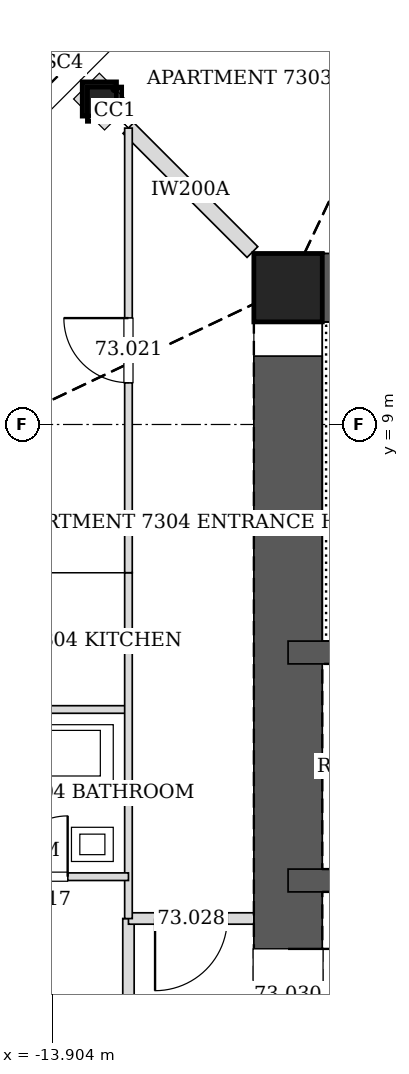
"""IFC4 building model, lengths in metres.
Left out: names, types, materials, properties, quantities, classifications, styles, units other than length and angle.
Written with IfcOpenShell. Run it as: python <this file> out.ifc"""

import sys

from ifc_helpers import new_model, si_unit, direction, frame, frame_2d, origin, origin_2d, place, context, subcontext, project, spatial, rectangle, hollow_rectangle, extrude, element, fill, save


model = new_model("IFC4")
c1 = context("Model", 3, precision=1e-05, world=origin(), true_north=direction((0.0, 1.0)))
c2 = subcontext(c1, "Body", "Model", "MODEL_VIEW")
j1 = project(units=[si_unit("LENGTHUNIT", "METRE"), si_unit("PLANEANGLEUNIT", "RADIAN")], contexts=[c1])
p1 = place(None, origin())
s1 = spatial("IfcSite", under=j1, at=p1, CompositionType="ELEMENT")
p2 = place(p1, origin())
s2 = spatial("IfcBuilding", under=s1, at=p2, CompositionType="ELEMENT")
p3 = place(p2, frame((0.0, 0.0, 298.0)))
s3 = spatial("IfcBuildingStorey", under=s2, at=p3, CompositionType="ELEMENT", Elevation=298.0)
p4 = place(p3, frame((-13.283, 13.283, 0.0), z_axis=(0.01995470925, -0.01995470925, 0.999601730269), x_axis=(0.707106781187, 0.707106781187, 0.0)))
e1 = element("IfcColumn", 1, at=p4, inside=s3, PredefinedType="COLUMN", context=c2, shape_type="SweptSolid", body=[
    extrude(hollow_rectangle(XDim=0.45, YDim=0.45, WallThickness=0.02, at=origin_2d()), origin(), (0.0, 0.0, 1.0), 3.401),
])
p5 = place(p3, frame((-10.8, 10.8, 0.0), z_axis=(0.0, 0.0, 1.0), x_axis=(1.0, 0.0, 0.0)))
e2 = element("IfcColumn", 2, at=p5, inside=s3, PredefinedType="COLUMN", context=c2, shape_type="SweptSolid", body=[
    extrude(hollow_rectangle(XDim=0.9, YDim=0.9, WallThickness=0.04, at=origin_2d()), origin(), (0.0, 0.0, 1.0), 3.4),
])
p6 = place(p3, frame((10.8, 10.8, 0.0), z_axis=(0.0, 0.0, 1.0), x_axis=(-1.0, 0.0, 0.0)))
e3 = element("IfcWall", 3, at=p6, inside=s3, PredefinedType="SOLIDWALL", context=c2, shape_type="SweptSolid", body=[
    extrude(rectangle(XDim=21.6, YDim=0.9, at=frame_2d((10.8, 0.0))), origin(), (0.0, 0.0, 1.0), 3.4),
])
p7 = place(p6, frame((10.05, 0.0, 0.0)))
e4 = element("IfcOpeningElement", 4, at=p7, cuts=e3, PredefinedType="OPENING", context=c2, shape_type="SweptSolid", body=[
    extrude(rectangle(XDim=1.5, YDim=2.1, at=frame_2d((0.75, 1.05))), frame((0.0, 0.46, 0.0), z_axis=(0.0, -1.0, 0.0), x_axis=(1.0, 0.0, 0.0)), (0.0, 0.0, 1.0), 0.92),
])
p8 = place(p3, frame((-10.8, 10.8, 0.0), z_axis=(0.0, 0.0, 1.0), x_axis=(0.0, -1.0, 0.0)))
e5 = element("IfcWall", 5, at=p8, inside=s3, PredefinedType="SOLIDWALL", context=c2, shape_type="SweptSolid", body=[
    extrude(rectangle(XDim=21.6, YDim=0.9, at=frame_2d((10.8, 0.0))), origin(), (0.0, 0.0, 1.0), 3.4),
])
p9 = place(p8, frame((8.7, 0.0, 0.0)))
e6 = element("IfcOpeningElement", 6, at=p9, cuts=e5, PredefinedType="OPENING", context=c2, shape_type="SweptSolid", body=[
    extrude(rectangle(XDim=1.2, YDim=2.1, at=frame_2d((0.6, 1.05))), frame((0.0, 0.46, 0.0), z_axis=(0.0, -1.0, 0.0), x_axis=(1.0, 0.0, 0.0)), (0.0, 0.0, 1.0), 0.92),
])
p10 = place(p8, frame((11.7, 0.0, 0.0)))
e7 = element("IfcOpeningElement", 7, at=p10, cuts=e5, PredefinedType="OPENING", context=c2, shape_type="SweptSolid", body=[
    extrude(rectangle(XDim=1.2, YDim=2.1, at=frame_2d((0.6, 1.05))), frame((0.0, 0.46, 0.0), z_axis=(0.0, -1.0, 0.0), x_axis=(1.0, 0.0, 0.0)), (0.0, 0.0, 1.0), 0.92),
])
p11 = place(p3, frame((-10.8, 3.0, 0.0), z_axis=(0.0, 0.0, 1.0), x_axis=(1.0, 0.0, 0.0)))
e8 = element("IfcWall", 8, at=p11, inside=s3, PredefinedType="SOLIDWALL", context=c2, shape_type="SweptSolid", body=[
    extrude(rectangle(XDim=21.6, YDim=0.3, at=frame_2d((10.8, 0.0))), origin(), (0.0, 0.0, 1.0), 3.4),
])
p12 = place(p11, frame((1.65, 0.0, 0.0)))
e9 = element("IfcOpeningElement", 9, at=p12, cuts=e8, PredefinedType="OPENING", context=c2, shape_type="SweptSolid", body=[
    extrude(rectangle(XDim=0.9, YDim=2.1, at=frame_2d((0.45, 1.05))), frame((0.0, 0.16, 0.0), z_axis=(0.0, -1.0, 0.0), x_axis=(1.0, 0.0, 0.0)), (0.0, 0.0, 1.0), 0.32),
])
p13 = place(p11, frame((4.55, 0.0, 0.0)))
e10 = element("IfcOpeningElement", 10, at=p13, cuts=e8, PredefinedType="OPENING", context=c2, shape_type="SweptSolid", body=[
    extrude(rectangle(XDim=0.9, YDim=2.1, at=frame_2d((0.45, 1.05))), frame((0.0, 0.16, 0.0), z_axis=(0.0, -1.0, 0.0), x_axis=(1.0, 0.0, 0.0)), (0.0, 0.0, 1.0), 0.32),
])
p14 = place(p11, frame((7.45, 0.0, 0.0)))
e11 = element("IfcOpeningElement", 11, at=p14, cuts=e8, PredefinedType="OPENING", context=c2, shape_type="SweptSolid", body=[
    extrude(rectangle(XDim=0.9, YDim=2.1, at=frame_2d((0.45, 1.05))), frame((0.0, 0.16, 0.0), z_axis=(0.0, -1.0, 0.0), x_axis=(1.0, 0.0, 0.0)), (0.0, 0.0, 1.0), 0.32),
])
p15 = place(p11, frame((13.25, 0.0, 0.0)))
e12 = element("IfcOpeningElement", 12, at=p15, cuts=e8, PredefinedType="OPENING", context=c2, shape_type="SweptSolid", body=[
    extrude(rectangle(XDim=0.9, YDim=2.1, at=frame_2d((0.45, 1.05))), frame((0.0, 0.16, 0.0), z_axis=(0.0, -1.0, 0.0), x_axis=(1.0, 0.0, 0.0)), (0.0, 0.0, 1.0), 0.32),
])
p16 = place(p11, frame((16.15, 0.0, 0.0)))
e13 = element("IfcOpeningElement", 13, at=p16, cuts=e8, PredefinedType="OPENING", context=c2, shape_type="SweptSolid", body=[
    extrude(rectangle(XDim=0.9, YDim=2.1, at=frame_2d((0.45, 1.05))), frame((0.0, 0.16, 0.0), z_axis=(0.0, -1.0, 0.0), x_axis=(1.0, 0.0, 0.0)), (0.0, 0.0, 1.0), 0.32),
])
p17 = place(p11, frame((19.05, 0.0, 0.0)))
e14 = element("IfcOpeningElement", 14, at=p17, cuts=e8, PredefinedType="OPENING", context=c2, shape_type="SweptSolid", body=[
    extrude(rectangle(XDim=0.9, YDim=2.1, at=frame_2d((0.45, 1.05))), frame((0.0, 0.16, 0.0), z_axis=(0.0, -1.0, 0.0), x_axis=(1.0, 0.0, 0.0)), (0.0, 0.0, 1.0), 0.32),
])
p18 = place(p3, frame((-10.8, 6.0, 0.0), z_axis=(0.0, 0.0, 1.0), x_axis=(1.0, 0.0, 0.0)))
e15 = element("IfcWall", 15, at=p18, inside=s3, PredefinedType="SOLIDWALL", context=c2, shape_type="SweptSolid", body=[
    extrude(rectangle(XDim=21.6, YDim=0.3, at=frame_2d((10.8, 0.0))), origin(), (0.0, 0.0, 1.0), 3.4),
])
p19 = place(p18, frame((10.25, 0.0, 0.0)))
e16 = element("IfcOpeningElement", 16, at=p19, cuts=e15, PredefinedType="OPENING", context=c2, shape_type="SweptSolid", body=[
    extrude(rectangle(XDim=1.1, YDim=2.1, at=frame_2d((0.55, 1.05))), frame((0.0, 0.16, 0.0), z_axis=(0.0, -1.0, 0.0), x_axis=(1.0, 0.0, 0.0)), (0.0, 0.0, 1.0), 0.32),
])
p20 = place(p3, frame((-12.9, 2.5, 0.0), z_axis=(0.0, 0.0, 1.0), x_axis=(0.0, -1.0, 0.0)))
e17 = element("IfcWall", 17, at=p20, inside=s3, PredefinedType="PARTITIONING", context=c2, shape_type="SweptSolid", body=[
    extrude(rectangle(XDim=9.251, YDim=0.15, at=frame_2d((4.625, 0.0))), origin(), (0.0, 0.0, 1.0), 2.349),
])
p21 = place(p3, frame((-11.25, 2.5, 0.0), z_axis=(0.0, 0.0, 1.0), x_axis=(-1.0, 0.0, 0.0)))
e18 = element("IfcWall", 18, at=p21, inside=s3, PredefinedType="PARTITIONING", context=c2, shape_type="SweptSolid", body=[
    extrude(rectangle(XDim=1.65, YDim=0.15, at=frame_2d((0.825, 0.0))), origin(), (0.0, 0.0, 1.0), 3.2),
])
p22 = place(p21, frame((0.35, 0.0, 0.0)))
e19 = element("IfcOpeningElement", 19, at=p22, cuts=e18, PredefinedType="OPENING", context=c2, shape_type="SweptSolid", body=[
    extrude(rectangle(XDim=0.95, YDim=2.1, at=frame_2d((0.475, 1.05))), frame((0.0, 0.085, 0.0), z_axis=(0.0, -1.0, 0.0), x_axis=(1.0, 0.0, 0.0)), (0.0, 0.0, 1.0), 0.17),
])
p23 = place(p3, frame((-12.901, 12.901, 0.0), z_axis=(0.0, 0.0, 1.0), x_axis=(0.707106781187, -0.707106781187, 0.0)))
e20 = element("IfcWall", 20, at=p23, inside=s3, PredefinedType="PARTITIONING", context=c2, shape_type="SweptSolid", body=[
    extrude(rectangle(XDim=2.308, YDim=0.2, at=frame_2d((1.154, 0.0))), origin(), (0.0, 0.0, 1.0), 2.591),
])
p24 = place(p3, frame((-15.3, 5.25, 0.0), z_axis=(0.0, 0.0, 1.0), x_axis=(1.0, 0.0, 0.0)))
e21 = element("IfcWall", 21, at=p24, inside=s3, PredefinedType="PARTITIONING", context=c2, shape_type="SweptSolid", body=[
    extrude(rectangle(XDim=2.4, YDim=0.1, at=frame_2d((1.2, 0.0))), origin(), (0.0, 0.0, 1.0), 2.662),
])
p25 = place(p3, frame((-12.9, 7.05, 0.0), z_axis=(0.0, 0.0, 1.0), x_axis=(0.0, -1.0, 0.0)))
e22 = element("IfcWall", 22, at=p25, inside=s3, PredefinedType="PARTITIONING", context=c2, shape_type="SweptSolid", body=[
    extrude(rectangle(XDim=4.551, YDim=0.1, at=frame_2d((2.275, 0.0))), origin(), (0.0, 0.0, 1.0), 3.2),
])
p26 = place(p3, frame((-15.3, 3.05, 0.0), z_axis=(0.0, 0.0, 1.0), x_axis=(1.0, 0.0, 0.0)))
e23 = element("IfcWall", 23, at=p26, inside=s3, PredefinedType="PARTITIONING", context=c2, shape_type="SweptSolid", body=[
    extrude(rectangle(XDim=2.4, YDim=0.1, at=frame_2d((1.2, 0.0))), origin(), (0.0, 0.0, 1.0), 2.662),
])
p27 = place(p26, frame((0.8, 0.0, 0.0)))
e24 = element("IfcOpeningElement", 24, at=p27, cuts=e23, PredefinedType="OPENING", context=c2, shape_type="SweptSolid", body=[
    extrude(rectangle(XDim=0.8, YDim=2.1, at=frame_2d((0.4, 1.05))), frame((0.0, 0.06, 0.0), z_axis=(0.0, -1.0, 0.0), x_axis=(1.0, 0.0, 0.0)), (0.0, 0.0, 1.0), 0.12),
])
p28 = place(p3, frame((-12.9, 7.05, 0.0), z_axis=(0.0, 0.0, 1.0), x_axis=(0.0, 1.0, 0.0)))
e25 = element("IfcWall", 25, at=p28, inside=s3, PredefinedType="PARTITIONING", context=c2, shape_type="SweptSolid", body=[
    extrude(rectangle(XDim=5.85, YDim=0.1, at=frame_2d((2.925, 0.0))), origin(), (0.0, 0.0, 1.0), 2.436),
])
p29 = place(p28, frame((2.5, 0.0, 0.0)))
e26 = element("IfcOpeningElement", 26, at=p29, cuts=e25, PredefinedType="OPENING", context=c2, shape_type="SweptSolid", body=[
    extrude(rectangle(XDim=0.85, YDim=2.1, at=frame_2d((0.425, 1.05))), frame((0.0, 0.06, 0.0), z_axis=(0.0, -1.0, 0.0), x_axis=(1.0, 0.0, 0.0)), (0.0, 0.0, 1.0), 0.12),
])
p30 = place(p27, origin())
e27 = element("IfcDoor", 27, at=p30, inside=s3, OperationType="SINGLE_SWING_RIGHT", PredefinedType="DOOR", context=c2, shape_type="SweptSolid", body=[
    extrude(rectangle(XDim=0.8, YDim=2.1, at=frame_2d((0.4, 1.05))), frame((0.0, 0.025, 0.0), z_axis=(0.0, -1.0, 0.0), x_axis=(1.0, 0.0, 0.0)), (0.0, 0.0, 1.0), 0.05),
])
fill(e24, e27)
p31 = place(p29, origin())
e28 = element("IfcDoor", 28, at=p31, inside=s3, OperationType="SINGLE_SWING_RIGHT", PredefinedType="DOOR", context=c2, shape_type="SweptSolid", body=[
    extrude(rectangle(XDim=0.85, YDim=2.1, at=frame_2d((0.425, 1.05))), frame((0.0, 0.025, 0.0), z_axis=(0.0, -1.0, 0.0), x_axis=(1.0, 0.0, 0.0)), (0.0, 0.0, 1.0), 0.05),
])
fill(e26, e28)
p32 = place(p22, origin())
e29 = element("IfcDoor", 29, at=p32, inside=s3, OperationType="SINGLE_SWING_RIGHT", PredefinedType="DOOR", context=c2, shape_type="SweptSolid", body=[
    extrude(rectangle(XDim=0.95, YDim=2.1, at=frame_2d((0.475, 1.05))), frame((0.0, 0.025, 0.0), z_axis=(0.0, -1.0, 0.0), x_axis=(1.0, 0.0, 0.0)), (0.0, 0.0, 1.0), 0.05),
])
fill(e19, e29)
p33 = place(p9, origin())
e30 = element("IfcDoor", 30, at=p33, inside=s3, OperationType="SINGLE_SWING_LEFT", PredefinedType="DOOR", context=c2, shape_type="SweptSolid", body=[
    extrude(rectangle(XDim=1.2, YDim=2.1, at=frame_2d((0.6, 1.05))), frame((0.0, 0.025, 0.0), z_axis=(0.0, -1.0, 0.0), x_axis=(1.0, 0.0, 0.0)), (0.0, 0.0, 1.0), 0.05),
])
fill(e6, e30)
save(model, sys.argv[1])
